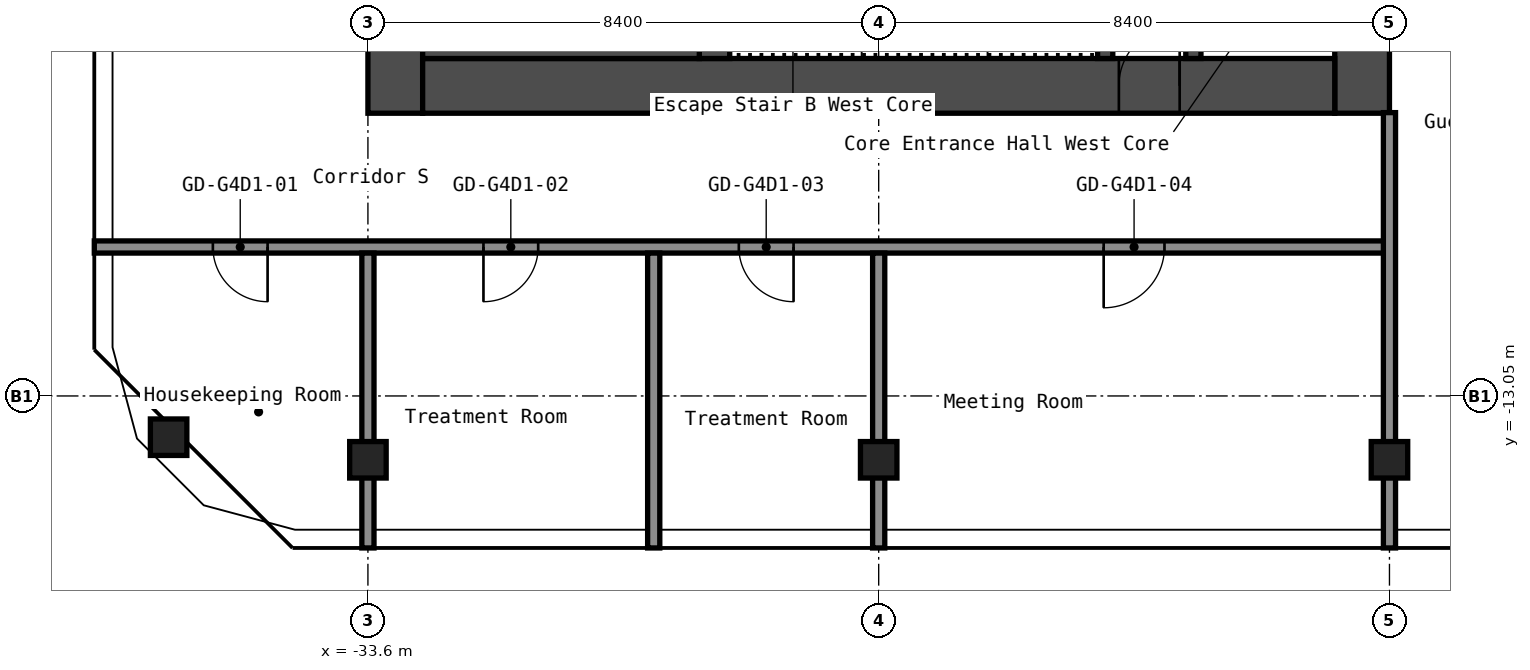
"""IFC4 building model, lengths in metres.
Left out: names, types, materials, properties, quantities, classifications, styles, units other than length and angle.
Written with IfcOpenShell. Run it as: python <this file> out.ifc"""

import sys

from ifc_helpers import new_model, si_unit, direction, frame, frame_2d, origin, origin_2d, place, context, subcontext, project, spatial, rectangle, hollow_rectangle, extrude, element, fill, save


model = new_model("IFC4")
c1 = context("Model", 3, precision=1e-05, world=origin(), true_north=direction((0.0, 1.0)))
c2 = subcontext(c1, "Body", "Model", "MODEL_VIEW")
j1 = project(units=[si_unit("LENGTHUNIT", "METRE"), si_unit("PLANEANGLEUNIT", "RADIAN")], contexts=[c1])
p1 = place(None, origin())
s1 = spatial("IfcSite", under=j1, at=p1, CompositionType="ELEMENT")
p2 = place(p1, origin())
s2 = spatial("IfcBuilding", under=s1, at=p2, CompositionType="ELEMENT")
p3 = place(p2, frame((0.0, 0.0, 212.2)))
s3 = spatial("IfcBuildingStorey", under=s2, at=p3, CompositionType="ELEMENT", Elevation=212.2)
for number, where, z_axis, x_axis in (
    (1, (-36.878, -13.729, 0.0), (0.0, 0.0, 1.0), (1.0, 0.0, 0.0)),
    (2, (-33.6, -14.1, 0.0), (0.0, 0.0, 1.0), (1.0, 0.0, 0.0)),
    (3, (-25.2, -14.1, 0.0), (0.0, 0.0, 1.0), (1.0, 0.0, 0.0)),
    (4, (-16.8, -14.1, 0.0), (0.0, 0.0, 1.0), (1.0, 0.0, 0.0)),
):
    element("IfcColumn", number, at=place(p3, frame(where, z_axis=z_axis, x_axis=x_axis)), inside=s3, PredefinedType="COLUMN", context=c2, shape_type="SweptSolid", body=[
        extrude(hollow_rectangle(XDim=0.6, YDim=0.6, WallThickness=0.025, InnerFilletRadius=0.038, OuterFilletRadius=0.062, at=origin_2d()), origin(), (0.0, 0.0, 1.0), 2.75),
    ])
p4 = place(p3, frame((-17.25, -8.4, 0.0), z_axis=(0.0, 0.0, 1.0), x_axis=(0.0, 1.0, 0.0)))
e5 = element("IfcWall", 5, at=p4, inside=s3, PredefinedType="SHEAR", context=c2, shape_type="SweptSolid", body=[
    extrude(rectangle(XDim=16.8, YDim=0.9, at=frame_2d((8.4, 0.0))), origin(), (0.0, 0.0, 1.0), 2.75),
])
p5 = place(p4, frame((10.1, 0.0, 0.0)))
e6 = element("IfcOpeningElement", 6, at=p5, cuts=e5, PredefinedType="OPENING", context=c2, shape_type="SweptSolid", body=[
    extrude(rectangle(XDim=1.6, YDim=2.1, at=frame_2d((0.8, 1.05))), frame((0.0, 0.46, 0.0), z_axis=(0.0, -1.0, 0.0), x_axis=(1.0, 0.0, 0.0)), (0.0, 0.0, 1.0), 0.92),
])
p6 = place(p3, frame((-33.15, -8.4, 0.0), z_axis=(0.0, 0.0, 1.0), x_axis=(0.0, 1.0, 0.0)))
e7 = element("IfcWall", 7, at=p6, inside=s3, PredefinedType="SHEAR", context=c2, shape_type="SweptSolid", body=[
    extrude(rectangle(XDim=16.8, YDim=0.9, at=frame_2d((8.4, 0.0))), origin(), (0.0, 0.0, 1.0), 2.75),
])
p7 = place(p3, frame((-32.7, -7.95, 0.0), z_axis=(0.0, 0.0, 1.0), x_axis=(1.0, 0.0, 0.0)))
e8 = element("IfcWall", 8, at=p7, inside=s3, PredefinedType="SHEAR", context=c2, shape_type="SweptSolid", body=[
    extrude(rectangle(XDim=15.0, YDim=0.9, at=frame_2d((7.5, 0.0))), origin(), (0.0, 0.0, 1.0), 2.75),
])
p8 = place(p7, frame((11.45, 0.0, 0.0)))
e9 = element("IfcOpeningElement", 9, at=p8, cuts=e8, PredefinedType="OPENING", context=c2, shape_type="SweptSolid", body=[
    extrude(rectangle(XDim=1.0, YDim=2.1, at=frame_2d((0.5, 1.05))), frame((0.0, 0.46, 0.0), z_axis=(0.0, -1.0, 0.0), x_axis=(1.0, 0.0, 0.0)), (0.0, 0.0, 1.0), 0.92),
])
p9 = place(p3, frame((-20.025, -7.5, 0.0), z_axis=(0.0, 0.0, 1.0), x_axis=(0.0, 1.0, 0.0)))
e10 = element("IfcWall", 10, at=p9, inside=s3, PredefinedType="SHEAR", context=c2, shape_type="SweptSolid", body=[
    extrude(rectangle(XDim=6.3, YDim=0.25, at=frame_2d((3.15, 0.0))), origin(), (0.0, 0.0, 1.0), 2.75),
])
p10 = place(p9, frame((2.4, 0.0, 0.0)))
e11 = element("IfcOpeningElement", 11, at=p10, cuts=e10, PredefinedType="OPENING", context=c2, shape_type="SweptSolid", body=[
    extrude(rectangle(XDim=1.0, YDim=2.1, at=frame_2d((0.5, 1.05))), frame((0.0, 0.135, 0.0), z_axis=(0.0, -1.0, 0.0), x_axis=(1.0, 0.0, 0.0)), (0.0, 0.0, 1.0), 0.27),
])
p11 = place(p3, frame((-21.475, -7.5, 0.0), z_axis=(0.0, 0.0, 1.0), x_axis=(0.0, 1.0, 0.0)))
e12 = element("IfcWall", 12, at=p11, inside=s3, PredefinedType="SHEAR", context=c2, shape_type="SweptSolid", body=[
    extrude(rectangle(XDim=3.75, YDim=0.25, at=frame_2d((1.875, 0.0))), origin(), (0.0, 0.0, 1.0), 2.75),
])
p12 = place(p11, frame((1.3, 0.0, 0.0)))
e13 = element("IfcOpeningElement", 13, at=p12, cuts=e12, PredefinedType="OPENING", context=c2, shape_type="SweptSolid", body=[
    extrude(rectangle(XDim=1.2, YDim=2.1, at=frame_2d((0.6, 1.05))), frame((0.0, 0.135, 0.0), z_axis=(0.0, -1.0, 0.0), x_axis=(1.0, 0.0, 0.0)), (0.0, 0.0, 1.0), 0.27),
])
p13 = place(p3, frame((-27.9, -7.5, 0.0), z_axis=(0.0, 0.0, 1.0), x_axis=(0.0, 1.0, 0.0)))
e14 = element("IfcWall", 14, at=p13, inside=s3, PredefinedType="SHEAR", context=c2, shape_type="SweptSolid", body=[
    extrude(rectangle(XDim=3.75, YDim=0.5, at=frame_2d((1.875, 0.0))), origin(), (0.0, 0.0, 1.0), 2.75),
])
p14 = place(p3, frame((-32.7, -6.75, 0.0), z_axis=(0.0, 0.0, 1.0), x_axis=(1.0, 0.0, 0.0)))
e15 = element("IfcWall", 15, at=p14, inside=s3, PredefinedType="SHEAR", context=c2, shape_type="SweptSolid", body=[
    extrude(rectangle(XDim=4.55, YDim=1.5, at=frame_2d((2.275, 0.0))), origin(), (0.0, 0.0, 1.0), 2.75),
])
p15 = place(p3, frame((-38.1, -10.6, 0.0), z_axis=(0.0, 0.0, 1.0), x_axis=(1.0, 0.0, 0.0)))
e16 = element("IfcWall", 16, at=p15, inside=s3, PredefinedType="PARTITIONING", context=c2, shape_type="SweptSolid", body=[
    extrude(rectangle(XDim=21.3, YDim=0.2, at=frame_2d((10.65, 0.0))), origin(), (0.0, 0.0, 1.0), 2.75),
])
p16 = place(p15, frame((1.95, 0.0, 0.0)))
e17 = element("IfcOpeningElement", 17, at=p16, cuts=e16, PredefinedType="OPENING", context=c2, shape_type="SweptSolid", body=[
    extrude(rectangle(XDim=0.9, YDim=2.1, at=frame_2d((0.45, 1.05))), frame((0.0, 0.11, 0.0), z_axis=(0.0, -1.0, 0.0), x_axis=(1.0, 0.0, 0.0)), (0.0, 0.0, 1.0), 0.22),
])
p17 = place(p15, frame((6.4, 0.0, 0.0)))
e18 = element("IfcOpeningElement", 18, at=p17, cuts=e16, PredefinedType="OPENING", context=c2, shape_type="SweptSolid", body=[
    extrude(rectangle(XDim=0.9, YDim=2.1, at=frame_2d((0.45, 1.05))), frame((0.0, 0.11, 0.0), z_axis=(0.0, -1.0, 0.0), x_axis=(1.0, 0.0, 0.0)), (0.0, 0.0, 1.0), 0.22),
])
p18 = place(p15, frame((10.6, 0.0, 0.0)))
e19 = element("IfcOpeningElement", 19, at=p18, cuts=e16, PredefinedType="OPENING", context=c2, shape_type="SweptSolid", body=[
    extrude(rectangle(XDim=0.9, YDim=2.1, at=frame_2d((0.45, 1.05))), frame((0.0, 0.11, 0.0), z_axis=(0.0, -1.0, 0.0), x_axis=(1.0, 0.0, 0.0)), (0.0, 0.0, 1.0), 0.22),
])
p19 = place(p15, frame((16.6, 0.0, 0.0)))
e20 = element("IfcOpeningElement", 20, at=p19, cuts=e16, PredefinedType="OPENING", context=c2, shape_type="SweptSolid", body=[
    extrude(rectangle(XDim=1.0, YDim=2.1, at=frame_2d((0.5, 1.05))), frame((0.0, 0.11, 0.0), z_axis=(0.0, -1.0, 0.0), x_axis=(1.0, 0.0, 0.0)), (0.0, 0.0, 1.0), 0.22),
])
for number, where, z_axis, x_axis in (
    (21, (-33.6, -15.55, 0.0), (0.0, 0.0, 1.0), (0.0, 1.0, 0.0)),
    (22, (-28.9, -15.55, 0.0), (0.0, 0.0, 1.0), (0.0, 1.0, 0.0)),
    (23, (-25.2, -15.55, 0.0), (0.0, 0.0, 1.0), (0.0, 1.0, 0.0)),
):
    element("IfcWall", number, at=place(p3, frame(where, z_axis=z_axis, x_axis=x_axis)), inside=s3, PredefinedType="PARTITIONING", context=c2, shape_type="SweptSolid", body=[
        extrude(rectangle(XDim=4.85, YDim=0.2, at=frame_2d((2.425, 0.0))), origin(), (0.0, 0.0, 1.0), 2.75),
    ])
p20 = place(p3, frame((-16.8, -15.55, 0.0), z_axis=(0.0, 0.0, 1.0), x_axis=(0.0, 1.0, 0.0)))
e24 = element("IfcWall", 24, at=p20, inside=s3, PredefinedType="PARTITIONING", context=c2, shape_type="SweptSolid", body=[
    extrude(rectangle(XDim=7.16, YDim=0.2, at=frame_2d((3.58, 0.0))), origin(), (0.0, 0.0, 1.0), 2.75),
])
p21 = place(p8, origin())
e25 = element("IfcDoor", 25, at=p21, inside=s3, OperationType="SINGLE_SWING_LEFT", PredefinedType="DOOR", context=c2, shape_type="SweptSolid", body=[
    extrude(rectangle(XDim=1.0, YDim=2.1, at=frame_2d((0.5, 1.05))), frame((0.0, 0.025, 0.0), z_axis=(0.0, -1.0, 0.0), x_axis=(1.0, 0.0, 0.0)), (0.0, 0.0, 1.0), 0.05),
])
fill(e9, e25)
p22 = place(p16, origin())
e26 = element("IfcDoor", 26, at=p22, inside=s3, OperationType="SINGLE_SWING_RIGHT", PredefinedType="DOOR", context=c2, shape_type="SweptSolid", body=[
    extrude(rectangle(XDim=0.9, YDim=2.1, at=frame_2d((0.45, 1.05))), frame((0.0, 0.025, 0.0), z_axis=(0.0, -1.0, 0.0), x_axis=(1.0, 0.0, 0.0)), (0.0, 0.0, 1.0), 0.05),
])
fill(e17, e26)
p23 = place(p17, origin())
e27 = element("IfcDoor", 27, at=p23, inside=s3, OperationType="SINGLE_SWING_LEFT", PredefinedType="DOOR", context=c2, shape_type="SweptSolid", body=[
    extrude(rectangle(XDim=0.9, YDim=2.1, at=frame_2d((0.45, 1.05))), frame((0.0, 0.025, 0.0), z_axis=(0.0, -1.0, 0.0), x_axis=(1.0, 0.0, 0.0)), (0.0, 0.0, 1.0), 0.05),
])
fill(e18, e27)
p24 = place(p18, origin())
e28 = element("IfcDoor", 28, at=p24, inside=s3, OperationType="SINGLE_SWING_RIGHT", PredefinedType="DOOR", context=c2, shape_type="SweptSolid", body=[
    extrude(rectangle(XDim=0.9, YDim=2.1, at=frame_2d((0.45, 1.05))), frame((0.0, 0.025, 0.0), z_axis=(0.0, -1.0, 0.0), x_axis=(1.0, 0.0, 0.0)), (0.0, 0.0, 1.0), 0.05),
])
fill(e19, e28)
p25 = place(p19, origin())
e29 = element("IfcDoor", 29, at=p25, inside=s3, OperationType="SINGLE_SWING_LEFT", PredefinedType="DOOR", context=c2, shape_type="SweptSolid", body=[
    extrude(rectangle(XDim=1.0, YDim=2.1, at=frame_2d((0.5, 1.05))), frame((0.0, 0.025, 0.0), z_axis=(0.0, -1.0, 0.0), x_axis=(1.0, 0.0, 0.0)), (0.0, 0.0, 1.0), 0.05),
])
fill(e20, e29)
save(model, sys.argv[1])
